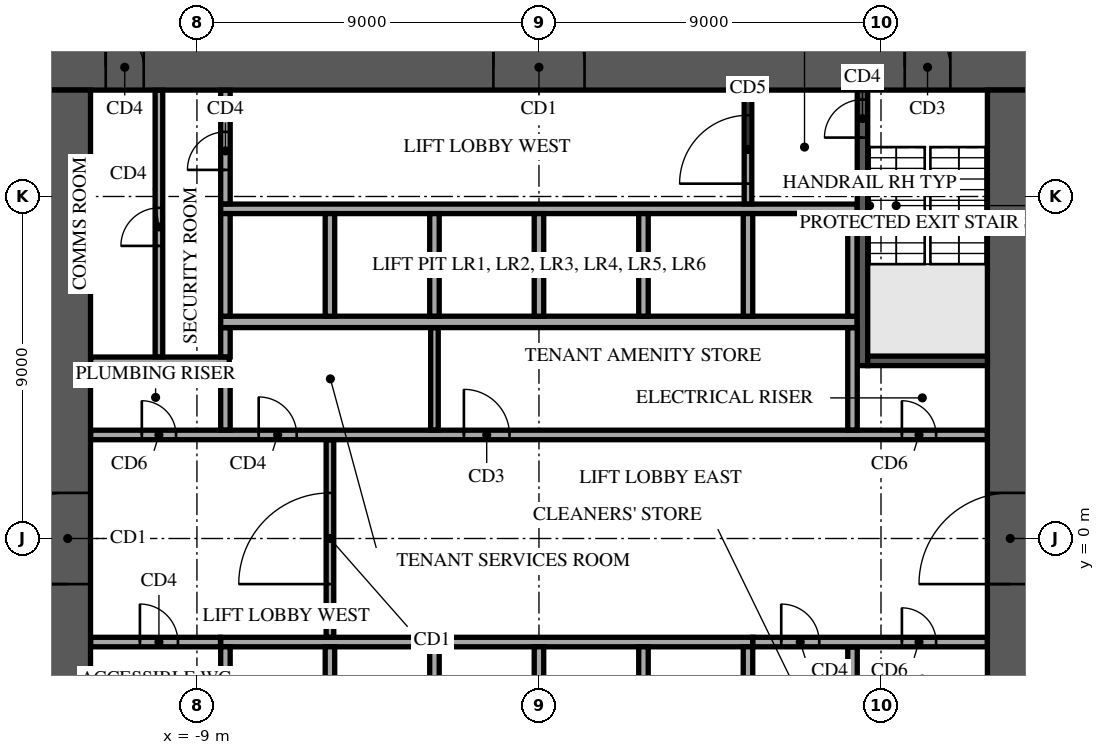
"""IFC4 building model, lengths in metres.
Left out: names, types, materials, properties, quantities, classifications, styles, units other than length and angle.
Written with IfcOpenShell. Run it as: python <this file> out.ifc"""

import sys

from ifc_helpers import new_model, si_unit, direction, frame, frame_2d, origin, place, context, subcontext, project, spatial, rectangle, extrude, element, fill, save


model = new_model("IFC4")
c1 = context("Model", 3, precision=1e-05, world=origin(), true_north=direction((0.0, 1.0)))
c2 = subcontext(c1, "Body", "Model", "MODEL_VIEW")
j1 = project(units=[si_unit("LENGTHUNIT", "METRE"), si_unit("PLANEANGLEUNIT", "RADIAN")], contexts=[c1])
p1 = place(None, origin())
s1 = spatial("IfcSite", under=j1, at=p1, CompositionType="ELEMENT")
p2 = place(p1, origin())
s2 = spatial("IfcBuilding", under=s1, at=p2, CompositionType="ELEMENT")
p3 = place(p2, frame((0.0, 0.0, -4.5)))
s3 = spatial("IfcBuildingStorey", under=s2, at=p3, CompositionType="ELEMENT", Elevation=-4.5)
p4 = place(p3, frame((-13.0, 12.4, 0.0), z_axis=(0.0, 0.0, 1.0), x_axis=(1.0, 0.0, 0.0)))
e1 = element("IfcWall", 1, at=p4, inside=s3, PredefinedType="SHEAR", context=c2, shape_type="SweptSolid", body=[
    extrude(rectangle(XDim=26.0, YDim=1.2, at=frame_2d((13.0, 0.0))), origin(), (0.0, 0.0, 1.0), 4.1),
])
p5 = place(p4, frame((11.8, 0.0, 0.0)))
e2 = element("IfcOpeningElement", 2, at=p5, cuts=e1, PredefinedType="OPENING", context=c2, shape_type="SweptSolid", body=[
    extrude(rectangle(XDim=2.4, YDim=2.4, at=frame_2d((1.2, 1.2))), frame((0.0, 0.61, 0.0), z_axis=(0.0, -1.0, 0.0), x_axis=(1.0, 0.0, 0.0)), (0.0, 0.0, 1.0), 1.22),
])
p6 = place(p4, frame((22.625, 0.0, 0.0)))
e3 = element("IfcOpeningElement", 3, at=p6, cuts=e1, PredefinedType="OPENING", context=c2, shape_type="SweptSolid", body=[
    extrude(rectangle(XDim=1.2, YDim=2.1, at=frame_2d((0.6, 1.05))), frame((0.0, 0.61, 0.0), z_axis=(0.0, -1.0, 0.0), x_axis=(1.0, 0.0, 0.0)), (0.0, 0.0, 1.0), 1.22),
])
p7 = place(p4, frame((1.6, 0.0, 0.0)))
e4 = element("IfcOpeningElement", 4, at=p7, cuts=e1, PredefinedType="OPENING", context=c2, shape_type="SweptSolid", body=[
    extrude(rectangle(XDim=1.0, YDim=2.1, at=frame_2d((0.5, 1.05))), frame((0.0, 0.61, 0.0), z_axis=(0.0, -1.0, 0.0), x_axis=(1.0, 0.0, 0.0)), (0.0, 0.0, 1.0), 1.22),
])
p8 = place(p3, frame((12.4, -11.8, 0.0), z_axis=(0.0, 0.0, 1.0), x_axis=(0.0, 1.0, 0.0)))
e5 = element("IfcWall", 5, at=p8, inside=s3, PredefinedType="SHEAR", context=c2, shape_type="SweptSolid", body=[
    extrude(rectangle(XDim=23.6, YDim=1.2, at=frame_2d((11.8, 0.0))), origin(), (0.0, 0.0, 1.0), 4.1),
])
p9 = place(p8, frame((10.6, 0.0, 0.0)))
e6 = element("IfcOpeningElement", 6, at=p9, cuts=e5, PredefinedType="OPENING", context=c2, shape_type="SweptSolid", body=[
    extrude(rectangle(XDim=2.4, YDim=2.4, at=frame_2d((1.2, 1.2))), frame((0.0, 0.61, 0.0), z_axis=(0.0, -1.0, 0.0), x_axis=(1.0, 0.0, 0.0)), (0.0, 0.0, 1.0), 1.22),
])
p10 = place(p3, frame((-12.4, -11.8, 0.0), z_axis=(0.0, 0.0, 1.0), x_axis=(0.0, 1.0, 0.0)))
e7 = element("IfcWall", 7, at=p10, inside=s3, PredefinedType="SHEAR", context=c2, shape_type="SweptSolid", body=[
    extrude(rectangle(XDim=23.6, YDim=1.2, at=frame_2d((11.8, 0.0))), origin(), (0.0, 0.0, 1.0), 4.1),
])
p11 = place(p10, frame((10.6, 0.0, 0.0)))
e8 = element("IfcOpeningElement", 8, at=p11, cuts=e7, PredefinedType="OPENING", context=c2, shape_type="SweptSolid", body=[
    extrude(rectangle(XDim=2.4, YDim=2.4, at=frame_2d((1.2, 1.2))), frame((0.0, 0.61, 0.0), z_axis=(0.0, -1.0, 0.0), x_axis=(1.0, 0.0, 0.0)), (0.0, 0.0, 1.0), 1.22),
])
p12 = place(p3, frame((-8.375, 5.7, 0.0), z_axis=(0.0, 0.0, 1.0), x_axis=(1.0, 0.0, 0.0)))
e9 = element("IfcWall", 9, at=p12, inside=s3, PredefinedType="SOLIDWALL", context=c2, shape_type="SweptSolid", body=[
    extrude(rectangle(XDim=16.75, YDim=0.3, at=frame_2d((8.375, 0.0))), origin(), (0.0, 0.0, 1.0), 4.1),
])
p13 = place(p3, frame((-8.375, 8.675, 0.0), z_axis=(0.0, 0.0, 1.0), x_axis=(1.0, 0.0, 0.0)))
e10 = element("IfcWall", 10, at=p13, inside=s3, PredefinedType="SOLIDWALL", context=c2, shape_type="SweptSolid", body=[
    extrude(rectangle(XDim=16.75, YDim=0.25, at=frame_2d((8.375, 0.0))), origin(), (0.0, 0.0, 1.0), 4.1),
])
for number, where, z_axis, x_axis in (
    (11, (-8.25, 5.85, 0.0), (0.0, 0.0, 1.0), (0.0, 1.0, 0.0)),
    (12, (-5.5, 5.85, 0.0), (0.0, 0.0, 1.0), (0.0, 1.0, 0.0)),
    (13, (-2.75, 5.85, 0.0), (0.0, 0.0, 1.0), (0.0, 1.0, 0.0)),
    (14, (0.0, 5.85, 0.0), (0.0, 0.0, 1.0), (0.0, 1.0, 0.0)),
    (15, (2.75, 5.85, 0.0), (0.0, 0.0, 1.0), (0.0, 1.0, 0.0)),
    (16, (5.5, 5.85, 0.0), (0.0, 0.0, 1.0), (0.0, 1.0, 0.0)),
    (17, (8.25, 5.85, 0.0), (0.0, 0.0, 1.0), (0.0, 1.0, 0.0)),
):
    element("IfcWall", number, at=place(p3, frame(where, z_axis=z_axis, x_axis=x_axis)), inside=s3, PredefinedType="SOLIDWALL", context=c2, shape_type="SweptSolid", body=[
        extrude(rectangle(XDim=2.7, YDim=0.25, at=frame_2d((1.35, 0.0))), origin(), (0.0, 0.0, 1.0), 4.1),
    ])
p14 = place(p3, frame((-8.375, -2.725, 0.0), z_axis=(0.0, 0.0, 1.0), x_axis=(1.0, 0.0, 0.0)))
e18 = element("IfcWall", 18, at=p14, inside=s3, PredefinedType="SOLIDWALL", context=c2, shape_type="SweptSolid", body=[
    extrude(rectangle(XDim=14.0, YDim=0.25, at=frame_2d((7.0, 0.0))), origin(), (0.0, 0.0, 1.0), 4.1),
])
for number, where, z_axis, x_axis in (
    (19, (-8.25, -5.55, 0.0), (0.0, 0.0, 1.0), (0.0, 1.0, 0.0)),
    (20, (-5.5, -5.55, 0.0), (0.0, 0.0, 1.0), (0.0, 1.0, 0.0)),
    (21, (-2.75, -5.55, 0.0), (0.0, 0.0, 1.0), (0.0, 1.0, 0.0)),
    (22, (0.0, -5.55, 0.0), (0.0, 0.0, 1.0), (0.0, 1.0, 0.0)),
    (23, (2.75, -5.55, 0.0), (0.0, 0.0, 1.0), (0.0, 1.0, 0.0)),
    (24, (5.5, -5.55, 0.0), (0.0, 0.0, 1.0), (0.0, 1.0, 0.0)),
):
    element("IfcWall", number, at=place(p3, frame(where, z_axis=z_axis, x_axis=x_axis)), inside=s3, PredefinedType="SOLIDWALL", context=c2, shape_type="SweptSolid", body=[
        extrude(rectangle(XDim=2.7, YDim=0.25, at=frame_2d((1.35, 0.0))), origin(), (0.0, 0.0, 1.0), 4.1),
    ])
p15 = place(p3, frame((8.512, 4.55, 0.0), z_axis=(0.0, 0.0, 1.0), x_axis=(0.0, 1.0, 0.0)))
e25 = element("IfcWall", 25, at=p15, inside=s3, PredefinedType="SOLIDWALL", context=c2, shape_type="SweptSolid", body=[
    extrude(rectangle(XDim=7.25, YDim=0.275, at=frame_2d((3.625, 0.0))), origin(), (0.0, 0.0, 1.0), 4.1),
])
p16 = place(p15, frame((6.0, 0.0, 0.0)))
e26 = element("IfcOpeningElement", 26, at=p16, cuts=e25, PredefinedType="OPENING", context=c2, shape_type="SweptSolid", body=[
    extrude(rectangle(XDim=1.0, YDim=2.1, at=frame_2d((0.5, 1.05))), frame((0.0, 0.147, 0.0), z_axis=(0.0, -1.0, 0.0), x_axis=(1.0, 0.0, 0.0)), (0.0, 0.0, 1.0), 0.295),
])
p17 = place(p3, frame((8.65, 4.675, 0.0), z_axis=(0.0, 0.0, 1.0), x_axis=(1.0, 0.0, 0.0)))
e27 = element("IfcWall", 27, at=p17, inside=s3, PredefinedType="SOLIDWALL", context=c2, shape_type="SweptSolid", body=[
    extrude(rectangle(XDim=3.15, YDim=0.25, at=frame_2d((1.575, 0.0))), origin(), (0.0, 0.0, 1.0), 4.1),
])
p18 = place(p3, frame((8.25, -5.545, 0.0), z_axis=(0.0, 0.0, 1.0), x_axis=(0.0, 1.0, 0.0)))
e28 = element("IfcWall", 28, at=p18, inside=s3, PredefinedType="PARTITIONING", context=c2, shape_type="SweptSolid", body=[
    extrude(rectangle(XDim=2.69, YDim=0.25, at=frame_2d((1.345, 0.0))), origin(), (0.0, 0.0, 1.0), 4.1),
])
p19 = place(p3, frame((-11.795, -2.725, 0.0), z_axis=(0.0, 0.0, 1.0), x_axis=(1.0, 0.0, 0.0)))
e29 = element("IfcWall", 29, at=p19, inside=s3, PredefinedType="PARTITIONING", context=c2, shape_type="SweptSolid", body=[
    extrude(rectangle(XDim=3.415, YDim=0.25, at=frame_2d((1.708, 0.0))), origin(), (0.0, 0.0, 1.0), 4.1),
])
p20 = place(p19, frame((1.295, 0.0, 0.0)))
e30 = element("IfcOpeningElement", 30, at=p20, cuts=e29, PredefinedType="OPENING", context=c2, shape_type="SweptSolid", body=[
    extrude(rectangle(XDim=1.0, YDim=2.1, at=frame_2d((0.5, 1.05))), frame((0.0, 0.135, 0.0), z_axis=(0.0, -1.0, 0.0), x_axis=(1.0, 0.0, 0.0)), (0.0, 0.0, 1.0), 0.27),
])
p21 = place(p3, frame((5.63, -2.725, 0.0), z_axis=(0.0, 0.0, 1.0), x_axis=(1.0, 0.0, 0.0)))
e31 = element("IfcWall", 31, at=p21, inside=s3, PredefinedType="PARTITIONING", context=c2, shape_type="SweptSolid", body=[
    extrude(rectangle(XDim=6.165, YDim=0.25, at=frame_2d((3.083, 0.0))), origin(), (0.0, 0.0, 1.0), 4.1),
])
p22 = place(p21, frame((0.745, 0.0, 0.0)))
e32 = element("IfcOpeningElement", 32, at=p22, cuts=e31, PredefinedType="OPENING", context=c2, shape_type="SweptSolid", body=[
    extrude(rectangle(XDim=1.0, YDim=2.1, at=frame_2d((0.5, 1.05))), frame((0.0, 0.135, 0.0), z_axis=(0.0, -1.0, 0.0), x_axis=(1.0, 0.0, 0.0)), (0.0, 0.0, 1.0), 0.27),
])
p23 = place(p21, frame((3.92, 0.0, 0.0)))
e33 = element("IfcOpeningElement", 33, at=p23, cuts=e31, PredefinedType="OPENING", context=c2, shape_type="SweptSolid", body=[
    extrude(rectangle(XDim=0.9, YDim=2.1, at=frame_2d((0.45, 1.05))), frame((0.0, 0.135, 0.0), z_axis=(0.0, -1.0, 0.0), x_axis=(1.0, 0.0, 0.0)), (0.0, 0.0, 1.0), 0.27),
])
p24 = place(p3, frame((-5.5, -2.595, 0.0), z_axis=(0.0, 0.0, 1.0), x_axis=(0.0, 1.0, 0.0)))
e34 = element("IfcWall", 34, at=p24, inside=s3, PredefinedType="PARTITIONING", context=c2, shape_type="SweptSolid", body=[
    extrude(rectangle(XDim=5.19, YDim=0.2, at=frame_2d((2.595, 0.0))), origin(), (0.0, 0.0, 1.0), 4.1),
])
p25 = place(p24, frame((1.395, 0.0, 0.0)))
e35 = element("IfcOpeningElement", 35, at=p25, cuts=e34, PredefinedType="OPENING", context=c2, shape_type="SweptSolid", body=[
    extrude(rectangle(XDim=2.4, YDim=2.4, at=frame_2d((1.2, 1.2))), frame((0.0, 0.11, 0.0), z_axis=(0.0, -1.0, 0.0), x_axis=(1.0, 0.0, 0.0)), (0.0, 0.0, 1.0), 0.22),
])
p26 = place(p3, frame((-11.795, 2.725, 0.0), z_axis=(0.0, 0.0, 1.0), x_axis=(1.0, 0.0, 0.0)))
e36 = element("IfcWall", 36, at=p26, inside=s3, PredefinedType="PARTITIONING", context=c2, shape_type="SweptSolid", body=[
    extrude(rectangle(XDim=23.59, YDim=0.25, at=frame_2d((11.795, 0.0))), origin(), (0.0, 0.0, 1.0), 4.1),
])
p27 = place(p26, frame((21.345, 0.0, 0.0)))
e37 = element("IfcOpeningElement", 37, at=p27, cuts=e36, PredefinedType="OPENING", context=c2, shape_type="SweptSolid", body=[
    extrude(rectangle(XDim=0.9, YDim=2.1, at=frame_2d((0.45, 1.05))), frame((0.0, 0.135, 0.0), z_axis=(0.0, -1.0, 0.0), x_axis=(1.0, 0.0, 0.0)), (0.0, 0.0, 1.0), 0.27),
])
p28 = place(p26, frame((1.345, 0.0, 0.0)))
e38 = element("IfcOpeningElement", 38, at=p28, cuts=e36, PredefinedType="OPENING", context=c2, shape_type="SweptSolid", body=[
    extrude(rectangle(XDim=0.9, YDim=2.1, at=frame_2d((0.45, 1.05))), frame((0.0, 0.135, 0.0), z_axis=(0.0, -1.0, 0.0), x_axis=(1.0, 0.0, 0.0)), (0.0, 0.0, 1.0), 0.27),
])
p29 = place(p26, frame((4.42, 0.0, 0.0)))
e39 = element("IfcOpeningElement", 39, at=p29, cuts=e36, PredefinedType="OPENING", context=c2, shape_type="SweptSolid", body=[
    extrude(rectangle(XDim=1.0, YDim=2.1, at=frame_2d((0.5, 1.05))), frame((0.0, 0.135, 0.0), z_axis=(0.0, -1.0, 0.0), x_axis=(1.0, 0.0, 0.0)), (0.0, 0.0, 1.0), 0.27),
])
p30 = place(p26, frame((9.82, 0.0, 0.0)))
e40 = element("IfcOpeningElement", 40, at=p30, cuts=e36, PredefinedType="OPENING", context=c2, shape_type="SweptSolid", body=[
    extrude(rectangle(XDim=1.2, YDim=2.1, at=frame_2d((0.6, 1.05))), frame((0.0, 0.135, 0.0), z_axis=(0.0, -1.0, 0.0), x_axis=(1.0, 0.0, 0.0)), (0.0, 0.0, 1.0), 0.27),
])
p31 = place(p3, frame((-8.25, 2.855, 0.0), z_axis=(0.0, 0.0, 1.0), x_axis=(0.0, 1.0, 0.0)))
e41 = element("IfcWall", 41, at=p31, inside=s3, PredefinedType="PARTITIONING", context=c2, shape_type="SweptSolid", body=[
    extrude(rectangle(XDim=1.715, YDim=0.25, at=frame_2d((0.857, 0.0))), origin(), (0.0, 0.0, 1.0), 4.1),
])
p32 = place(p3, frame((-2.75, 2.855, 0.0), z_axis=(0.0, 0.0, 1.0), x_axis=(0.0, 1.0, 0.0)))
e42 = element("IfcWall", 42, at=p32, inside=s3, PredefinedType="PARTITIONING", context=c2, shape_type="SweptSolid", body=[
    extrude(rectangle(XDim=2.69, YDim=0.2, at=frame_2d((1.345, 0.0))), origin(), (0.0, 0.0, 1.0), 4.1),
])
p33 = place(p3, frame((8.25, 2.855, 0.0), z_axis=(0.0, 0.0, 1.0), x_axis=(0.0, 1.0, 0.0)))
e43 = element("IfcWall", 43, at=p33, inside=s3, PredefinedType="PARTITIONING", context=c2, shape_type="SweptSolid", body=[
    extrude(rectangle(XDim=2.69, YDim=0.25, at=frame_2d((1.345, 0.0))), origin(), (0.0, 0.0, 1.0), 4.1),
])
p34 = place(p3, frame((-11.795, 4.675, 0.0), z_axis=(0.0, 0.0, 1.0), x_axis=(1.0, 0.0, 0.0)))
e44 = element("IfcWall", 44, at=p34, inside=s3, PredefinedType="PARTITIONING", context=c2, shape_type="SweptSolid", body=[
    extrude(rectangle(XDim=3.645, YDim=0.2, at=frame_2d((1.823, 0.0))), origin(), (0.0, 0.0, 1.0), 4.1),
])
p35 = place(p3, frame((-10.0, 4.78, 0.0), z_axis=(0.0, 0.0, 1.0), x_axis=(0.0, 1.0, 0.0)))
e45 = element("IfcWall", 45, at=p35, inside=s3, PredefinedType="PARTITIONING", context=c2, shape_type="SweptSolid", body=[
    extrude(rectangle(XDim=7.015, YDim=0.2, at=frame_2d((3.507, 0.0))), origin(), (0.0, 0.0, 1.0), 4.1),
])
p36 = place(p35, frame((2.92, 0.0, 0.0)))
e46 = element("IfcOpeningElement", 46, at=p36, cuts=e45, PredefinedType="OPENING", context=c2, shape_type="SweptSolid", body=[
    extrude(rectangle(XDim=1.0, YDim=2.1, at=frame_2d((0.5, 1.05))), frame((0.0, 0.11, 0.0), z_axis=(0.0, -1.0, 0.0), x_axis=(1.0, 0.0, 0.0)), (0.0, 0.0, 1.0), 0.22),
])
p37 = place(p3, frame((-8.25, 4.78, 0.0), z_axis=(0.0, 0.0, 1.0), x_axis=(0.0, 1.0, 0.0)))
e47 = element("IfcWall", 47, at=p37, inside=s3, PredefinedType="PARTITIONING", context=c2, shape_type="SweptSolid", body=[
    extrude(rectangle(XDim=0.765, YDim=0.25, at=frame_2d((0.382, 0.0))), origin(), (0.0, 0.0, 1.0), 4.1),
])
p38 = place(p3, frame((-8.25, 8.805, 0.0), z_axis=(0.0, 0.0, 1.0), x_axis=(0.0, 1.0, 0.0)))
e48 = element("IfcWall", 48, at=p38, inside=s3, PredefinedType="PARTITIONING", context=c2, shape_type="SweptSolid", body=[
    extrude(rectangle(XDim=2.99, YDim=0.25, at=frame_2d((1.495, 0.0))), origin(), (0.0, 0.0, 1.0), 4.1),
])
p39 = place(p38, frame((0.895, 0.0, 0.0)))
e49 = element("IfcOpeningElement", 49, at=p39, cuts=e48, PredefinedType="OPENING", context=c2, shape_type="SweptSolid", body=[
    extrude(rectangle(XDim=1.0, YDim=2.1, at=frame_2d((0.5, 1.05))), frame((0.0, 0.135, 0.0), z_axis=(0.0, -1.0, 0.0), x_axis=(1.0, 0.0, 0.0)), (0.0, 0.0, 1.0), 0.27),
])
p40 = place(p3, frame((5.5, 8.805, 0.0), z_axis=(0.0, 0.0, 1.0), x_axis=(0.0, 1.0, 0.0)))
e50 = element("IfcWall", 50, at=p40, inside=s3, PredefinedType="PARTITIONING", context=c2, shape_type="SweptSolid", body=[
    extrude(rectangle(XDim=2.99, YDim=0.2, at=frame_2d((1.495, 0.0))), origin(), (0.0, 0.0, 1.0), 4.1),
])
p41 = place(p40, frame((0.532, 0.0, 0.0)))
e51 = element("IfcOpeningElement", 51, at=p41, cuts=e50, PredefinedType="OPENING", context=c2, shape_type="SweptSolid", body=[
    extrude(rectangle(XDim=1.8, YDim=2.1, at=frame_2d((0.9, 1.05))), frame((0.0, 0.11, 0.0), z_axis=(0.0, -1.0, 0.0), x_axis=(1.0, 0.0, 0.0)), (0.0, 0.0, 1.0), 0.22),
])
p42 = place(p5, origin())
e52 = element("IfcDoor", 52, at=p42, inside=s3, OperationType="SINGLE_SWING_LEFT", PredefinedType="DOOR", context=c2, shape_type="SweptSolid", body=[
    extrude(rectangle(XDim=2.4, YDim=2.4, at=frame_2d((1.2, 1.2))), frame((0.0, 0.025, 0.0), z_axis=(0.0, -1.0, 0.0), x_axis=(1.0, 0.0, 0.0)), (0.0, 0.0, 1.0), 0.05),
])
fill(e2, e52)
p43 = place(p6, origin())
e53 = element("IfcDoor", 53, at=p43, inside=s3, OperationType="SINGLE_SWING_LEFT", PredefinedType="DOOR", context=c2, shape_type="SweptSolid", body=[
    extrude(rectangle(XDim=1.2, YDim=2.1, at=frame_2d((0.6, 1.05))), frame((0.0, 0.025, 0.0), z_axis=(0.0, -1.0, 0.0), x_axis=(1.0, 0.0, 0.0)), (0.0, 0.0, 1.0), 0.05),
])
fill(e3, e53)
p44 = place(p7, origin())
e54 = element("IfcDoor", 54, at=p44, inside=s3, OperationType="SINGLE_SWING_LEFT", PredefinedType="DOOR", context=c2, shape_type="SweptSolid", body=[
    extrude(rectangle(XDim=1.0, YDim=2.1, at=frame_2d((0.5, 1.05))), frame((0.0, 0.025, 0.0), z_axis=(0.0, -1.0, 0.0), x_axis=(1.0, 0.0, 0.0)), (0.0, 0.0, 1.0), 0.05),
])
fill(e4, e54)
p45 = place(p9, origin())
e55 = element("IfcDoor", 55, at=p45, inside=s3, OperationType="SINGLE_SWING_LEFT", PredefinedType="DOOR", context=c2, shape_type="SweptSolid", body=[
    extrude(rectangle(XDim=2.4, YDim=2.4, at=frame_2d((1.2, 1.2))), frame((0.0, 0.025, 0.0), z_axis=(0.0, -1.0, 0.0), x_axis=(1.0, 0.0, 0.0)), (0.0, 0.0, 1.0), 0.05),
])
fill(e6, e55)
p46 = place(p11, origin())
e56 = element("IfcDoor", 56, at=p46, inside=s3, OperationType="SINGLE_SWING_LEFT", PredefinedType="DOOR", context=c2, shape_type="SweptSolid", body=[
    extrude(rectangle(XDim=2.4, YDim=2.4, at=frame_2d((1.2, 1.2))), frame((0.0, 0.025, 0.0), z_axis=(0.0, -1.0, 0.0), x_axis=(1.0, 0.0, 0.0)), (0.0, 0.0, 1.0), 0.05),
])
fill(e8, e56)
p47 = place(p16, origin())
e57 = element("IfcDoor", 57, at=p47, inside=s3, OperationType="SINGLE_SWING_LEFT", PredefinedType="DOOR", context=c2, shape_type="SweptSolid", body=[
    extrude(rectangle(XDim=1.0, YDim=2.1, at=frame_2d((0.5, 1.05))), frame((0.0, 0.025, 0.0), z_axis=(0.0, -1.0, 0.0), x_axis=(1.0, 0.0, 0.0)), (0.0, 0.0, 1.0), 0.05),
])
fill(e26, e57)
p48 = place(p20, origin())
e58 = element("IfcDoor", 58, at=p48, inside=s3, OperationType="SINGLE_SWING_RIGHT", PredefinedType="DOOR", context=c2, shape_type="SweptSolid", body=[
    extrude(rectangle(XDim=1.0, YDim=2.1, at=frame_2d((0.5, 1.05))), frame((0.0, 0.025, 0.0), z_axis=(0.0, -1.0, 0.0), x_axis=(1.0, 0.0, 0.0)), (0.0, 0.0, 1.0), 0.05),
])
fill(e30, e58)
p49 = place(p22, origin())
e59 = element("IfcDoor", 59, at=p49, inside=s3, OperationType="SINGLE_SWING_RIGHT", PredefinedType="DOOR", context=c2, shape_type="SweptSolid", body=[
    extrude(rectangle(XDim=1.0, YDim=2.1, at=frame_2d((0.5, 1.05))), frame((0.0, 0.025, 0.0), z_axis=(0.0, -1.0, 0.0), x_axis=(1.0, 0.0, 0.0)), (0.0, 0.0, 1.0), 0.05),
])
fill(e32, e59)
p50 = place(p27, origin())
e60 = element("IfcDoor", 60, at=p50, inside=s3, OperationType="SINGLE_SWING_RIGHT", PredefinedType="DOOR", context=c2, shape_type="SweptSolid", body=[
    extrude(rectangle(XDim=0.9, YDim=2.1, at=frame_2d((0.45, 1.05))), frame((0.0, 0.025, 0.0), z_axis=(0.0, -1.0, 0.0), x_axis=(1.0, 0.0, 0.0)), (0.0, 0.0, 1.0), 0.05),
])
fill(e37, e60)
p51 = place(p23, origin())
e61 = element("IfcDoor", 61, at=p51, inside=s3, OperationType="SINGLE_SWING_RIGHT", PredefinedType="DOOR", context=c2, shape_type="SweptSolid", body=[
    extrude(rectangle(XDim=0.9, YDim=2.1, at=frame_2d((0.45, 1.05))), frame((0.0, 0.025, 0.0), z_axis=(0.0, -1.0, 0.0), x_axis=(1.0, 0.0, 0.0)), (0.0, 0.0, 1.0), 0.05),
])
fill(e33, e61)
p52 = place(p28, origin())
e62 = element("IfcDoor", 62, at=p52, inside=s3, OperationType="SINGLE_SWING_RIGHT", PredefinedType="DOOR", context=c2, shape_type="SweptSolid", body=[
    extrude(rectangle(XDim=0.9, YDim=2.1, at=frame_2d((0.45, 1.05))), frame((0.0, 0.025, 0.0), z_axis=(0.0, -1.0, 0.0), x_axis=(1.0, 0.0, 0.0)), (0.0, 0.0, 1.0), 0.05),
])
fill(e38, e62)
p53 = place(p36, origin())
e63 = element("IfcDoor", 63, at=p53, inside=s3, OperationType="SINGLE_SWING_RIGHT", PredefinedType="DOOR", context=c2, shape_type="SweptSolid", body=[
    extrude(rectangle(XDim=1.0, YDim=2.1, at=frame_2d((0.5, 1.05))), frame((0.0, 0.025, 0.0), z_axis=(0.0, -1.0, 0.0), x_axis=(1.0, 0.0, 0.0)), (0.0, 0.0, 1.0), 0.05),
])
fill(e46, e63)
p54 = place(p39, origin())
e64 = element("IfcDoor", 64, at=p54, inside=s3, OperationType="SINGLE_SWING_RIGHT", PredefinedType="DOOR", context=c2, shape_type="SweptSolid", body=[
    extrude(rectangle(XDim=1.0, YDim=2.1, at=frame_2d((0.5, 1.05))), frame((0.0, 0.025, 0.0), z_axis=(0.0, -1.0, 0.0), x_axis=(1.0, 0.0, 0.0)), (0.0, 0.0, 1.0), 0.05),
])
fill(e49, e64)
p55 = place(p29, origin())
e65 = element("IfcDoor", 65, at=p55, inside=s3, OperationType="SINGLE_SWING_RIGHT", PredefinedType="DOOR", context=c2, shape_type="SweptSolid", body=[
    extrude(rectangle(XDim=1.0, YDim=2.1, at=frame_2d((0.5, 1.05))), frame((0.0, 0.025, 0.0), z_axis=(0.0, -1.0, 0.0), x_axis=(1.0, 0.0, 0.0)), (0.0, 0.0, 1.0), 0.05),
])
fill(e39, e65)
p56 = place(p30, origin())
e66 = element("IfcDoor", 66, at=p56, inside=s3, OperationType="SINGLE_SWING_LEFT", PredefinedType="DOOR", context=c2, shape_type="SweptSolid", body=[
    extrude(rectangle(XDim=1.2, YDim=2.1, at=frame_2d((0.6, 1.05))), frame((0.0, 0.025, 0.0), z_axis=(0.0, -1.0, 0.0), x_axis=(1.0, 0.0, 0.0)), (0.0, 0.0, 1.0), 0.05),
])
fill(e40, e66)
p57 = place(p25, origin())
e67 = element("IfcDoor", 67, at=p57, inside=s3, OperationType="DOUBLE_DOOR_DOUBLE_SWING", PredefinedType="DOOR", context=c2, shape_type="SweptSolid", body=[
    extrude(rectangle(XDim=2.4, YDim=2.4, at=frame_2d((1.2, 1.2))), frame((0.0, 0.025, 0.0), z_axis=(0.0, -1.0, 0.0), x_axis=(1.0, 0.0, 0.0)), (0.0, 0.0, 1.0), 0.05),
])
fill(e35, e67)
p58 = place(p41, origin())
e68 = element("IfcDoor", 68, at=p58, inside=s3, OperationType="SINGLE_SWING_LEFT", PredefinedType="DOOR", context=c2, shape_type="SweptSolid", body=[
    extrude(rectangle(XDim=1.8, YDim=2.1, at=frame_2d((0.9, 1.05))), frame((0.0, 0.025, 0.0), z_axis=(0.0, -1.0, 0.0), x_axis=(1.0, 0.0, 0.0)), (0.0, 0.0, 1.0), 0.05),
])
fill(e51, e68)
save(model, sys.argv[1])
